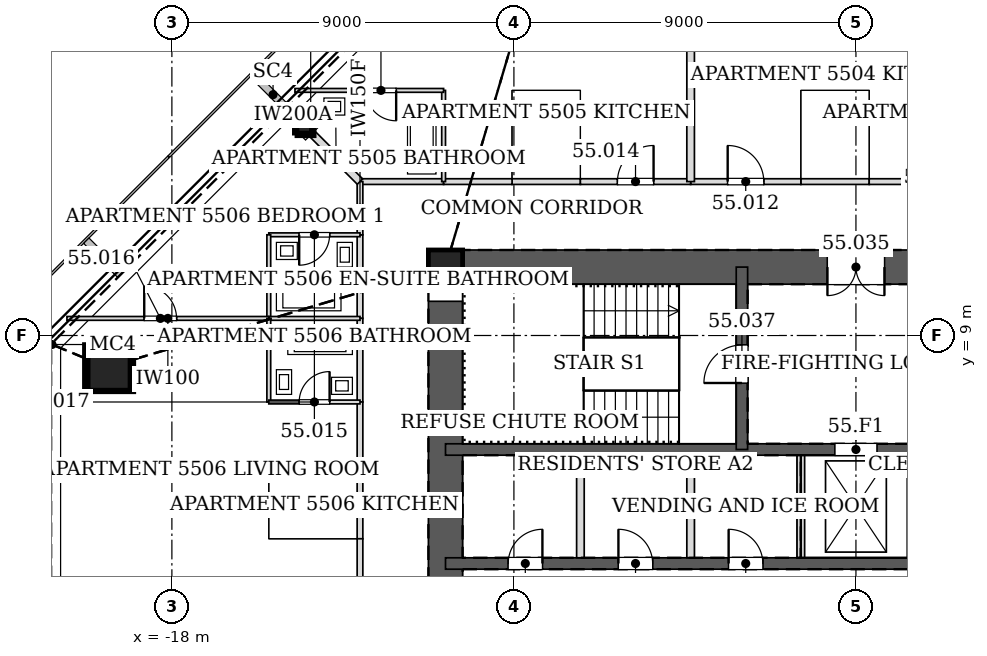
"""IFC4 building model, lengths in metres.
Left out: names, types, materials, properties, quantities, classifications, styles, units other than length and angle.
Written with IfcOpenShell. Run it as: python <this file> out.ifc"""

import sys

from ifc_helpers import new_model, si_unit, direction, frame, frame_2d, origin, origin_2d, place, context, subcontext, project, spatial, rectangle, hollow_rectangle, extrude, element, fill, save


model = new_model("IFC4")
c1 = context("Model", 3, precision=1e-05, world=origin(), true_north=direction((0.0, 1.0)))
c2 = subcontext(c1, "Body", "Model", "MODEL_VIEW")
j1 = project(units=[si_unit("LENGTHUNIT", "METRE"), si_unit("PLANEANGLEUNIT", "RADIAN")], contexts=[c1])
p1 = place(None, origin())
s1 = spatial("IfcSite", under=j1, at=p1, CompositionType="ELEMENT")
p2 = place(p1, origin())
s2 = spatial("IfcBuilding", under=s1, at=p2, CompositionType="ELEMENT")
p3 = place(p2, frame((0.0, 0.0, 234.6)))
s3 = spatial("IfcBuildingStorey", under=s2, at=p3, CompositionType="ELEMENT", Elevation=234.6)
p4 = place(p3, frame((-19.7, 8.16, 0.0), z_axis=(0.02827915051, -0.01169924247, 0.999531598986), x_axis=(0.382282742426, 0.924045401938, 0.0)))
e1 = element("IfcColumn", 1, at=p4, inside=s3, PredefinedType="COLUMN", context=c2, shape_type="SweptSolid", body=[
    extrude(hollow_rectangle(XDim=1.2, YDim=1.2, WallThickness=0.055, at=origin_2d()), origin(), (0.0, 0.0, 1.0), 3.402),
])
p5 = place(p3, frame((-14.551, 14.551, 0.0), z_axis=(0.020026431307, -0.020026431307, 0.999598861593), x_axis=(0.707106781187, 0.707106781187, 0.0)))
e2 = element("IfcColumn", 2, at=p5, inside=s3, PredefinedType="COLUMN", context=c2, shape_type="SweptSolid", body=[
    extrude(hollow_rectangle(XDim=0.45, YDim=0.45, WallThickness=0.02, at=origin_2d()), origin(), (0.0, 0.0, 1.0), 3.401),
])
p6 = place(p3, frame((-10.8, 10.8, 0.0), z_axis=(0.0, 0.0, 1.0), x_axis=(1.0, 0.0, 0.0)))
e3 = element("IfcColumn", 3, at=p6, inside=s3, PredefinedType="COLUMN", context=c2, shape_type="SweptSolid", body=[
    extrude(hollow_rectangle(XDim=0.9, YDim=0.9, WallThickness=0.04, at=origin_2d()), origin(), (0.0, 0.0, 1.0), 3.4),
])
p7 = place(p3, frame((10.8, 10.8, 0.0), z_axis=(0.0, 0.0, 1.0), x_axis=(-1.0, 0.0, 0.0)))
e4 = element("IfcWall", 4, at=p7, inside=s3, PredefinedType="SOLIDWALL", context=c2, shape_type="SweptSolid", body=[
    extrude(rectangle(XDim=21.6, YDim=0.9, at=frame_2d((10.8, 0.0))), origin(), (0.0, 0.0, 1.0), 3.4),
])
p8 = place(p7, frame((10.05, 0.0, 0.0)))
e5 = element("IfcOpeningElement", 5, at=p8, cuts=e4, PredefinedType="OPENING", context=c2, shape_type="SweptSolid", body=[
    extrude(rectangle(XDim=1.5, YDim=2.1, at=frame_2d((0.75, 1.05))), frame((0.0, 0.46, 0.0), z_axis=(0.0, -1.0, 0.0), x_axis=(1.0, 0.0, 0.0)), (0.0, 0.0, 1.0), 0.92),
])
p9 = place(p3, frame((-10.8, 10.8, 0.0), z_axis=(0.0, 0.0, 1.0), x_axis=(0.0, -1.0, 0.0)))
e6 = element("IfcWall", 6, at=p9, inside=s3, PredefinedType="SOLIDWALL", context=c2, shape_type="SweptSolid", body=[
    extrude(rectangle(XDim=21.6, YDim=0.9, at=frame_2d((10.8, 0.0))), origin(), (0.0, 0.0, 1.0), 3.4),
])
p10 = place(p9, frame((8.7, 0.0, 0.0)))
e7 = element("IfcOpeningElement", 7, at=p10, cuts=e6, PredefinedType="OPENING", context=c2, shape_type="SweptSolid", body=[
    extrude(rectangle(XDim=1.2, YDim=2.1, at=frame_2d((0.6, 1.05))), frame((0.0, 0.46, 0.0), z_axis=(0.0, -1.0, 0.0), x_axis=(1.0, 0.0, 0.0)), (0.0, 0.0, 1.0), 0.92),
])
p11 = place(p9, frame((11.7, 0.0, 0.0)))
e8 = element("IfcOpeningElement", 8, at=p11, cuts=e6, PredefinedType="OPENING", context=c2, shape_type="SweptSolid", body=[
    extrude(rectangle(XDim=1.2, YDim=2.1, at=frame_2d((0.6, 1.05))), frame((0.0, 0.46, 0.0), z_axis=(0.0, -1.0, 0.0), x_axis=(1.0, 0.0, 0.0)), (0.0, 0.0, 1.0), 0.92),
])
p12 = place(p3, frame((-10.8, 3.0, 0.0), z_axis=(0.0, 0.0, 1.0), x_axis=(1.0, 0.0, 0.0)))
e9 = element("IfcWall", 9, at=p12, inside=s3, PredefinedType="SOLIDWALL", context=c2, shape_type="SweptSolid", body=[
    extrude(rectangle(XDim=21.6, YDim=0.3, at=frame_2d((10.8, 0.0))), origin(), (0.0, 0.0, 1.0), 3.4),
])
p13 = place(p12, frame((1.65, 0.0, 0.0)))
e10 = element("IfcOpeningElement", 10, at=p13, cuts=e9, PredefinedType="OPENING", context=c2, shape_type="SweptSolid", body=[
    extrude(rectangle(XDim=0.9, YDim=2.1, at=frame_2d((0.45, 1.05))), frame((0.0, 0.16, 0.0), z_axis=(0.0, -1.0, 0.0), x_axis=(1.0, 0.0, 0.0)), (0.0, 0.0, 1.0), 0.32),
])
p14 = place(p12, frame((7.45, 0.0, 0.0)))
e11 = element("IfcOpeningElement", 11, at=p14, cuts=e9, PredefinedType="OPENING", context=c2, shape_type="SweptSolid", body=[
    extrude(rectangle(XDim=0.9, YDim=2.1, at=frame_2d((0.45, 1.05))), frame((0.0, 0.16, 0.0), z_axis=(0.0, -1.0, 0.0), x_axis=(1.0, 0.0, 0.0)), (0.0, 0.0, 1.0), 0.32),
])
p15 = place(p12, frame((13.25, 0.0, 0.0)))
e12 = element("IfcOpeningElement", 12, at=p15, cuts=e9, PredefinedType="OPENING", context=c2, shape_type="SweptSolid", body=[
    extrude(rectangle(XDim=0.9, YDim=2.1, at=frame_2d((0.45, 1.05))), frame((0.0, 0.16, 0.0), z_axis=(0.0, -1.0, 0.0), x_axis=(1.0, 0.0, 0.0)), (0.0, 0.0, 1.0), 0.32),
])
p16 = place(p12, frame((16.15, 0.0, 0.0)))
e13 = element("IfcOpeningElement", 13, at=p16, cuts=e9, PredefinedType="OPENING", context=c2, shape_type="SweptSolid", body=[
    extrude(rectangle(XDim=0.9, YDim=2.1, at=frame_2d((0.45, 1.05))), frame((0.0, 0.16, 0.0), z_axis=(0.0, -1.0, 0.0), x_axis=(1.0, 0.0, 0.0)), (0.0, 0.0, 1.0), 0.32),
])
p17 = place(p12, frame((19.05, 0.0, 0.0)))
e14 = element("IfcOpeningElement", 14, at=p17, cuts=e9, PredefinedType="OPENING", context=c2, shape_type="SweptSolid", body=[
    extrude(rectangle(XDim=0.9, YDim=2.1, at=frame_2d((0.45, 1.05))), frame((0.0, 0.16, 0.0), z_axis=(0.0, -1.0, 0.0), x_axis=(1.0, 0.0, 0.0)), (0.0, 0.0, 1.0), 0.32),
])
p18 = place(p12, frame((4.55, 0.0, 0.0)))
e15 = element("IfcOpeningElement", 15, at=p18, cuts=e9, PredefinedType="OPENING", context=c2, shape_type="SweptSolid", body=[
    extrude(rectangle(XDim=0.9, YDim=2.1, at=frame_2d((0.45, 1.05))), frame((0.0, 0.16, 0.0), z_axis=(0.0, -1.0, 0.0), x_axis=(1.0, 0.0, 0.0)), (0.0, 0.0, 1.0), 0.32),
])
p19 = place(p3, frame((-10.8, 6.0, 0.0), z_axis=(0.0, 0.0, 1.0), x_axis=(1.0, 0.0, 0.0)))
e16 = element("IfcWall", 16, at=p19, inside=s3, PredefinedType="SOLIDWALL", context=c2, shape_type="SweptSolid", body=[
    extrude(rectangle(XDim=21.6, YDim=0.3, at=frame_2d((10.8, 0.0))), origin(), (0.0, 0.0, 1.0), 3.4),
])
p20 = place(p19, frame((10.25, 0.0, 0.0)))
e17 = element("IfcOpeningElement", 17, at=p20, cuts=e16, PredefinedType="OPENING", context=c2, shape_type="SweptSolid", body=[
    extrude(rectangle(XDim=1.1, YDim=2.1, at=frame_2d((0.55, 1.05))), frame((0.0, 0.16, 0.0), z_axis=(0.0, -1.0, 0.0), x_axis=(1.0, 0.0, 0.0)), (0.0, 0.0, 1.0), 0.32),
])
p21 = place(p3, frame((-3.0, 6.0, 0.0), z_axis=(0.0, 0.0, 1.0), x_axis=(0.0, 1.0, 0.0)))
e18 = element("IfcWall", 18, at=p21, inside=s3, PredefinedType="SOLIDWALL", context=c2, shape_type="SweptSolid", body=[
    extrude(rectangle(XDim=4.8, YDim=0.3, at=frame_2d((2.4, 0.0))), origin(), (0.0, 0.0, 1.0), 3.4),
])
p22 = place(p21, frame((1.75, 0.0, 0.0)))
e19 = element("IfcOpeningElement", 19, at=p22, cuts=e18, PredefinedType="OPENING", context=c2, shape_type="SweptSolid", body=[
    extrude(rectangle(XDim=1.0, YDim=2.1, at=frame_2d((0.5, 1.05))), frame((0.0, 0.16, 0.0), z_axis=(0.0, -1.0, 0.0), x_axis=(1.0, 0.0, 0.0)), (0.0, 0.0, 1.0), 0.32),
])
p23 = place(p3, frame((0.351, 13.05, 0.0), z_axis=(0.0, 0.0, 1.0), x_axis=(-1.0, 0.0, 0.0)))
e20 = element("IfcWall", 20, at=p23, inside=s3, PredefinedType="PARTITIONING", context=c2, shape_type="SweptSolid", body=[
    extrude(rectangle(XDim=1.802, YDim=0.15, at=frame_2d((0.901, 0.0))), origin(), (0.0, 0.0, 1.0), 2.331),
])
p24 = place(p3, frame((-1.449, 13.05, 0.0), z_axis=(0.0, 0.0, 1.0), x_axis=(-1.0, 0.0, 0.0)))
e21 = element("IfcWall", 21, at=p24, inside=s3, PredefinedType="PARTITIONING", context=c2, shape_type="SweptSolid", body=[
    extrude(rectangle(XDim=2.902, YDim=0.15, at=frame_2d((1.451, 0.0))), origin(), (0.0, 0.0, 1.0), 2.73),
])
p25 = place(p24, frame((0.976, 0.0, 0.0)))
e22 = element("IfcOpeningElement", 22, at=p25, cuts=e21, PredefinedType="OPENING", context=c2, shape_type="SweptSolid", body=[
    extrude(rectangle(XDim=0.95, YDim=2.1, at=frame_2d((0.475, 1.05))), frame((0.0, 0.085, 0.0), z_axis=(0.0, -1.0, 0.0), x_axis=(1.0, 0.0, 0.0)), (0.0, 0.0, 1.0), 0.17),
])
p26 = place(p3, frame((2.151, 13.05, 0.0), z_axis=(0.0, 0.0, 1.0), x_axis=(-1.0, 0.0, 0.0)))
e23 = element("IfcWall", 23, at=p26, inside=s3, PredefinedType="PARTITIONING", context=c2, shape_type="SweptSolid", body=[
    extrude(rectangle(XDim=1.802, YDim=0.15, at=frame_2d((0.901, 0.0))), origin(), (0.0, 0.0, 1.0), 2.73),
])
p27 = place(p3, frame((-10.849, 13.05, 0.0), z_axis=(0.0, 0.0, 1.0), x_axis=(-1.0, 0.0, 0.0)))
e24 = element("IfcWall", 24, at=p27, inside=s3, PredefinedType="PARTITIONING", context=c2, shape_type="SweptSolid", body=[
    extrude(rectangle(XDim=2.201, YDim=0.15, at=frame_2d((1.101, 0.0))), origin(), (0.0, 0.0, 1.0), 2.583),
])
p28 = place(p3, frame((-7.249, 13.05, 0.0), z_axis=(0.0, 0.0, 1.0), x_axis=(-1.0, 0.0, 0.0)))
e25 = element("IfcWall", 25, at=p28, inside=s3, PredefinedType="PARTITIONING", context=c2, shape_type="SweptSolid", body=[
    extrude(rectangle(XDim=1.802, YDim=0.15, at=frame_2d((0.901, 0.0))), origin(), (0.0, 0.0, 1.0), 2.73),
])
p29 = place(p3, frame((-9.049, 13.05, 0.0), z_axis=(0.0, 0.0, 1.0), x_axis=(-1.0, 0.0, 0.0)))
e26 = element("IfcWall", 26, at=p29, inside=s3, PredefinedType="PARTITIONING", context=c2, shape_type="SweptSolid", body=[
    extrude(rectangle(XDim=1.802, YDim=0.15, at=frame_2d((0.901, 0.0))), origin(), (0.0, 0.0, 1.0), 2.344),
])
p30 = place(p3, frame((-4.349, 13.05, 0.0), z_axis=(0.0, 0.0, 1.0), x_axis=(-1.0, 0.0, 0.0)))
e27 = element("IfcWall", 27, at=p30, inside=s3, PredefinedType="PARTITIONING", context=c2, shape_type="SweptSolid", body=[
    extrude(rectangle(XDim=2.902, YDim=0.15, at=frame_2d((1.451, 0.0))), origin(), (0.0, 0.0, 1.0), 2.73),
])
p31 = place(p30, frame((0.976, 0.0, 0.0)))
e28 = element("IfcOpeningElement", 28, at=p31, cuts=e27, PredefinedType="OPENING", context=c2, shape_type="SweptSolid", body=[
    extrude(rectangle(XDim=0.95, YDim=2.1, at=frame_2d((0.475, 1.05))), frame((0.0, 0.085, 0.0), z_axis=(0.0, -1.0, 0.0), x_axis=(1.0, 0.0, 0.0)), (0.0, 0.0, 1.0), 0.17),
])
p32 = place(p3, frame((-13.05, 11.651, 0.0), z_axis=(0.0, 0.0, 1.0), x_axis=(0.0, -1.0, 0.0)))
e29 = element("IfcWall", 29, at=p32, inside=s3, PredefinedType="PARTITIONING", context=c2, shape_type="SweptSolid", body=[
    extrude(rectangle(XDim=2.202, YDim=0.15, at=frame_2d((1.101, 0.0))), origin(), (0.0, 0.0, 1.0), 2.344),
])
p33 = place(p3, frame((-13.05, 13.05, 0.0), z_axis=(0.0, 0.0, 1.0), x_axis=(0.0, -1.0, 0.0)))
e30 = element("IfcWall", 30, at=p33, inside=s3, PredefinedType="PARTITIONING", context=c2, shape_type="SweptSolid", body=[
    extrude(rectangle(XDim=1.401, YDim=0.15, at=frame_2d((0.701, 0.0))), origin(), (0.0, 0.0, 1.0), 2.583),
])
p34 = place(p3, frame((-13.05, 9.451, 0.0), z_axis=(0.0, 0.0, 1.0), x_axis=(0.0, -1.0, 0.0)))
e31 = element("IfcWall", 31, at=p34, inside=s3, PredefinedType="PARTITIONING", context=c2, shape_type="SweptSolid", body=[
    extrude(rectangle(XDim=2.202, YDim=0.15, at=frame_2d((1.101, 0.0))), origin(), (0.0, 0.0, 1.0), 2.73),
])
p35 = place(p3, frame((-13.05, 5.451, 0.0), z_axis=(0.0, 0.0, 1.0), x_axis=(0.0, -1.0, 0.0)))
e32 = element("IfcWall", 32, at=p35, inside=s3, PredefinedType="PARTITIONING", context=c2, shape_type="SweptSolid", body=[
    extrude(rectangle(XDim=1.802, YDim=0.15, at=frame_2d((0.901, 0.0))), origin(), (0.0, 0.0, 1.0), 2.73),
])
p36 = place(p3, frame((-13.05, 3.651, 0.0), z_axis=(0.0, 0.0, 1.0), x_axis=(0.0, -1.0, 0.0)))
e33 = element("IfcWall", 33, at=p36, inside=s3, PredefinedType="PARTITIONING", context=c2, shape_type="SweptSolid", body=[
    extrude(rectangle(XDim=4.402, YDim=0.15, at=frame_2d((2.201, 0.0))), origin(), (0.0, 0.0, 1.0), 2.331),
])
p37 = place(p36, frame((1.726, 0.0, 0.0)))
e34 = element("IfcOpeningElement", 34, at=p37, cuts=e33, PredefinedType="OPENING", context=c2, shape_type="SweptSolid", body=[
    extrude(rectangle(XDim=0.95, YDim=2.1, at=frame_2d((0.475, 1.05))), frame((0.0, 0.085, 0.0), z_axis=(0.0, -1.0, 0.0), x_axis=(1.0, 0.0, 0.0)), (0.0, 0.0, 1.0), 0.17),
])
p38 = place(p3, frame((-13.05, 7.251, 0.0), z_axis=(0.0, 0.0, 1.0), x_axis=(0.0, -1.0, 0.0)))
e35 = element("IfcWall", 35, at=p38, inside=s3, PredefinedType="PARTITIONING", context=c2, shape_type="SweptSolid", body=[
    extrude(rectangle(XDim=1.802, YDim=0.15, at=frame_2d((0.901, 0.0))), origin(), (0.0, 0.0, 1.0), 2.73),
])
p39 = place(p3, frame((-4.35, 21.36, 0.0), z_axis=(0.0, 0.0, 1.0), x_axis=(0.0, -1.0, 0.0)))
e36 = element("IfcWall", 36, at=p39, inside=s3, PredefinedType="PARTITIONING", context=c2, shape_type="SweptSolid", body=[
    extrude(rectangle(XDim=8.31, YDim=0.2, at=frame_2d((4.155, 0.0))), origin(), (0.0, 0.0, 1.0), 2.662),
])
p40 = place(p3, frame((-10.85, 13.05, 0.0), z_axis=(0.0, 0.0, 1.0), x_axis=(0.0, 1.0, 0.0)))
e37 = element("IfcWall", 37, at=p40, inside=s3, PredefinedType="PARTITIONING", context=c2, shape_type="SweptSolid", body=[
    extrude(rectangle(XDim=2.4, YDim=0.1, at=frame_2d((1.2, 0.0))), origin(), (0.0, 0.0, 1.0), 2.786),
])
p41 = place(p3, frame((-10.85, 15.45, 0.0), z_axis=(0.0, 0.0, 1.0), x_axis=(-1.0, 0.0, 0.0)))
e38 = element("IfcWall", 38, at=p41, inside=s3, PredefinedType="PARTITIONING", context=c2, shape_type="SweptSolid", body=[
    extrude(rectangle(XDim=3.912, YDim=0.1, at=frame_2d((1.956, 0.0))), origin(), (0.0, 0.0, 1.0), 2.783),
])
p42 = place(p41, frame((1.249, 0.0, 0.0)))
e39 = element("IfcOpeningElement", 39, at=p42, cuts=e38, PredefinedType="OPENING", context=c2, shape_type="SweptSolid", body=[
    extrude(rectangle(XDim=0.8, YDim=2.1, at=frame_2d((0.4, 1.05))), frame((0.0, 0.06, 0.0), z_axis=(0.0, -1.0, 0.0), x_axis=(1.0, 0.0, 0.0)), (0.0, 0.0, 1.0), 0.12),
])
p43 = place(p3, frame((-14.31, 14.31, 0.0), z_axis=(0.0, 0.0, 1.0), x_axis=(0.707106781187, -0.707106781187, 0.0)))
e40 = element("IfcWall", 40, at=p43, inside=s3, PredefinedType="PARTITIONING", context=c2, shape_type="SweptSolid", body=[
    extrude(rectangle(XDim=1.782, YDim=0.2, at=frame_2d((0.891, 0.0))), origin(), (0.0, 0.0, 1.0), 2.583),
])
p44 = place(p3, frame((-13.05, 11.65, 0.0), z_axis=(0.0, 0.0, 1.0), x_axis=(-1.0, 0.0, 0.0)))
e41 = element("IfcWall", 41, at=p44, inside=s3, PredefinedType="PARTITIONING", context=c2, shape_type="SweptSolid", body=[
    extrude(rectangle(XDim=2.4, YDim=0.1, at=frame_2d((1.2, 0.0))), origin(), (0.0, 0.0, 1.0), 2.786),
])
p45 = place(p44, frame((0.8, 0.0, 0.0)))
e42 = element("IfcOpeningElement", 42, at=p45, cuts=e41, PredefinedType="OPENING", context=c2, shape_type="SweptSolid", body=[
    extrude(rectangle(XDim=0.8, YDim=2.1, at=frame_2d((0.4, 1.05))), frame((0.0, 0.06, 0.0), z_axis=(0.0, -1.0, 0.0), x_axis=(1.0, 0.0, 0.0)), (0.0, 0.0, 1.0), 0.12),
])
p46 = place(p3, frame((-15.45, 11.65, 0.0), z_axis=(0.0, 0.0, 1.0), x_axis=(0.0, -1.0, 0.0)))
e43 = element("IfcWall", 43, at=p46, inside=s3, PredefinedType="PARTITIONING", context=c2, shape_type="SweptSolid", body=[
    extrude(rectangle(XDim=2.2, YDim=0.1, at=frame_2d((1.1, 0.0))), origin(), (0.0, 0.0, 1.0), 2.344),
])
p47 = place(p3, frame((-15.45, 9.45, 0.0), z_axis=(0.0, 0.0, 1.0), x_axis=(1.0, 0.0, 0.0)))
e44 = element("IfcWall", 44, at=p47, inside=s3, PredefinedType="PARTITIONING", context=c2, shape_type="SweptSolid", body=[
    extrude(rectangle(XDim=2.4, YDim=0.1, at=frame_2d((1.2, 0.0))), origin(), (0.0, 0.0, 1.0), 2.344),
])
p48 = place(p3, frame((-20.762, 9.45, 0.0), z_axis=(0.0, 0.0, 1.0), x_axis=(1.0, 0.0, 0.0)))
e45 = element("IfcWall", 45, at=p48, inside=s3, PredefinedType="PARTITIONING", context=c2, shape_type="SweptSolid", body=[
    extrude(rectangle(XDim=5.312, YDim=0.1, at=frame_2d((2.656, 0.0))), origin(), (0.0, 0.0, 1.0), 2.344),
])
p49 = place(p48, frame((2.034, 0.0, 0.0)))
e46 = element("IfcOpeningElement", 46, at=p49, cuts=e45, PredefinedType="OPENING", context=c2, shape_type="SweptSolid", body=[
    extrude(rectangle(XDim=0.85, YDim=2.1, at=frame_2d((0.425, 1.05))), frame((0.0, 0.06, 0.0), z_axis=(0.0, -1.0, 0.0), x_axis=(1.0, 0.0, 0.0)), (0.0, 0.0, 1.0), 0.12),
])
p50 = place(p3, frame((-15.45, 9.45, 0.0), z_axis=(0.0, 0.0, 1.0), x_axis=(0.0, -1.0, 0.0)))
e47 = element("IfcWall", 47, at=p50, inside=s3, PredefinedType="PARTITIONING", context=c2, shape_type="SweptSolid", body=[
    extrude(rectangle(XDim=2.2, YDim=0.1, at=frame_2d((1.1, 0.0))), origin(), (0.0, 0.0, 1.0), 2.344),
])
p51 = place(p3, frame((-15.45, 7.25, 0.0), z_axis=(0.0, 0.0, 1.0), x_axis=(1.0, 0.0, 0.0)))
e48 = element("IfcWall", 48, at=p51, inside=s3, PredefinedType="PARTITIONING", context=c2, shape_type="SweptSolid", body=[
    extrude(rectangle(XDim=2.4, YDim=0.1, at=frame_2d((1.2, 0.0))), origin(), (0.0, 0.0, 1.0), 2.73),
])
p52 = place(p51, frame((0.8, 0.0, 0.0)))
e49 = element("IfcOpeningElement", 49, at=p52, cuts=e48, PredefinedType="OPENING", context=c2, shape_type="SweptSolid", body=[
    extrude(rectangle(XDim=0.8, YDim=2.1, at=frame_2d((0.4, 1.05))), frame((0.0, 0.06, 0.0), z_axis=(0.0, -1.0, 0.0), x_axis=(1.0, 0.0, 0.0)), (0.0, 0.0, 1.0), 0.12),
])
for number, where, z_axis, x_axis in (
    (50, (-7.25, 3.15, 0.0), (0.0, 0.0, 1.0), (0.0, 1.0, 0.0)),
    (51, (-4.35, 3.15, 0.0), (0.0, 0.0, 1.0), (0.0, 1.0, 0.0)),
    (52, (-1.45, 3.15, 0.0), (0.0, 0.0, 1.0), (0.0, 1.0, 0.0)),
    (53, (1.45, 3.15, 0.0), (0.0, 0.0, 1.0), (0.0, 1.0, 0.0)),
):
    element("IfcWall", number, at=place(p3, frame(where, z_axis=z_axis, x_axis=x_axis)), inside=s3, PredefinedType="PARTITIONING", context=c2, shape_type="SweptSolid", body=[
        extrude(rectangle(XDim=2.7, YDim=0.2, at=frame_2d((1.35, 0.0))), origin(), (0.0, 0.0, 1.0), 3.2),
    ])
p53 = place(p25, frame((0.95, 0.0, 0.0), z_axis=(0.0, 0.0, 1.0), x_axis=(-1.0, 0.0, 0.0)))
e54 = element("IfcDoor", 54, at=p53, inside=s3, OperationType="SINGLE_SWING_LEFT", PredefinedType="DOOR", context=c2, shape_type="SweptSolid", body=[
    extrude(rectangle(XDim=0.95, YDim=2.1, at=frame_2d((0.475, 1.05))), frame((0.0, 0.025, 0.0), z_axis=(0.0, -1.0, 0.0), x_axis=(1.0, 0.0, 0.0)), (0.0, 0.0, 1.0), 0.05),
])
fill(e22, e54)
p54 = place(p42, origin())
e55 = element("IfcDoor", 55, at=p54, inside=s3, OperationType="SINGLE_SWING_LEFT", PredefinedType="DOOR", context=c2, shape_type="SweptSolid", body=[
    extrude(rectangle(XDim=0.8, YDim=2.1, at=frame_2d((0.4, 1.05))), frame((0.0, 0.025, 0.0), z_axis=(0.0, -1.0, 0.0), x_axis=(1.0, 0.0, 0.0)), (0.0, 0.0, 1.0), 0.05),
])
fill(e39, e55)
p55 = place(p31, frame((0.95, 0.0, 0.0), z_axis=(0.0, 0.0, 1.0), x_axis=(-1.0, 0.0, 0.0)))
e56 = element("IfcDoor", 56, at=p55, inside=s3, OperationType="SINGLE_SWING_RIGHT", PredefinedType="DOOR", context=c2, shape_type="SweptSolid", body=[
    extrude(rectangle(XDim=0.95, YDim=2.1, at=frame_2d((0.475, 1.05))), frame((0.0, 0.025, 0.0), z_axis=(0.0, -1.0, 0.0), x_axis=(1.0, 0.0, 0.0)), (0.0, 0.0, 1.0), 0.05),
])
fill(e28, e56)
p56 = place(p45, origin())
e57 = element("IfcDoor", 57, at=p56, inside=s3, OperationType="SINGLE_SWING_RIGHT", PredefinedType="DOOR", context=c2, shape_type="SweptSolid", body=[
    extrude(rectangle(XDim=0.8, YDim=2.1, at=frame_2d((0.4, 1.05))), frame((0.0, 0.025, 0.0), z_axis=(0.0, -1.0, 0.0), x_axis=(1.0, 0.0, 0.0)), (0.0, 0.0, 1.0), 0.05),
])
fill(e42, e57)
p57 = place(p49, origin())
e58 = element("IfcDoor", 58, at=p57, inside=s3, OperationType="SINGLE_SWING_LEFT", PredefinedType="DOOR", context=c2, shape_type="SweptSolid", body=[
    extrude(rectangle(XDim=0.85, YDim=2.1, at=frame_2d((0.425, 1.05))), frame((0.0, 0.025, 0.0), z_axis=(0.0, -1.0, 0.0), x_axis=(1.0, 0.0, 0.0)), (0.0, 0.0, 1.0), 0.05),
])
fill(e46, e58)
p58 = place(p52, origin())
e59 = element("IfcDoor", 59, at=p58, inside=s3, OperationType="SINGLE_SWING_RIGHT", PredefinedType="DOOR", context=c2, shape_type="SweptSolid", body=[
    extrude(rectangle(XDim=0.8, YDim=2.1, at=frame_2d((0.4, 1.05))), frame((0.0, 0.025, 0.0), z_axis=(0.0, -1.0, 0.0), x_axis=(1.0, 0.0, 0.0)), (0.0, 0.0, 1.0), 0.05),
])
fill(e49, e59)
p59 = place(p8, origin())
e60 = element("IfcDoor", 60, at=p59, inside=s3, OperationType="DOUBLE_DOOR_SINGLE_SWING", PredefinedType="DOOR", context=c2, shape_type="SweptSolid", body=[
    extrude(rectangle(XDim=1.5, YDim=2.1, at=frame_2d((0.75, 1.05))), frame((0.0, 0.025, 0.0), z_axis=(0.0, -1.0, 0.0), x_axis=(1.0, 0.0, 0.0)), (0.0, 0.0, 1.0), 0.05),
])
fill(e5, e60)
p60 = place(p22, origin())
e61 = element("IfcDoor", 61, at=p60, inside=s3, OperationType="SINGLE_SWING_LEFT", PredefinedType="DOOR", context=c2, shape_type="SweptSolid", body=[
    extrude(rectangle(XDim=1.0, YDim=2.1, at=frame_2d((0.5, 1.05))), frame((0.0, 0.025, 0.0), z_axis=(0.0, -1.0, 0.0), x_axis=(1.0, 0.0, 0.0)), (0.0, 0.0, 1.0), 0.05),
])
fill(e19, e61)
p61 = place(p13, origin())
e62 = element("IfcDoor", 62, at=p61, inside=s3, OperationType="SINGLE_SWING_RIGHT", PredefinedType="DOOR", context=c2, shape_type="SweptSolid", body=[
    extrude(rectangle(XDim=0.9, YDim=2.1, at=frame_2d((0.45, 1.05))), frame((0.0, 0.025, 0.0), z_axis=(0.0, -1.0, 0.0), x_axis=(1.0, 0.0, 0.0)), (0.0, 0.0, 1.0), 0.05),
])
fill(e10, e62)
p62 = place(p14, origin())
e63 = element("IfcDoor", 63, at=p62, inside=s3, OperationType="SINGLE_SWING_LEFT", PredefinedType="DOOR", context=c2, shape_type="SweptSolid", body=[
    extrude(rectangle(XDim=0.9, YDim=2.1, at=frame_2d((0.45, 1.05))), frame((0.0, 0.025, 0.0), z_axis=(0.0, -1.0, 0.0), x_axis=(1.0, 0.0, 0.0)), (0.0, 0.0, 1.0), 0.05),
])
fill(e11, e63)
p63 = place(p18, origin())
e64 = element("IfcDoor", 64, at=p63, inside=s3, OperationType="SINGLE_SWING_LEFT", PredefinedType="DOOR", context=c2, shape_type="SweptSolid", body=[
    extrude(rectangle(XDim=0.9, YDim=2.1, at=frame_2d((0.45, 1.05))), frame((0.0, 0.025, 0.0), z_axis=(0.0, -1.0, 0.0), x_axis=(1.0, 0.0, 0.0)), (0.0, 0.0, 1.0), 0.05),
])
fill(e15, e64)
p64 = place(p20, origin())
e65 = element("IfcDoor", 65, at=p64, inside=s3, OperationType="DOUBLE_DOOR_SLIDING", PredefinedType="DOOR", context=c2, shape_type="SweptSolid", body=[
    extrude(rectangle(XDim=1.1, YDim=2.1, at=frame_2d((0.55, 1.05))), frame((0.0, 0.025, 0.0), z_axis=(0.0, -1.0, 0.0), x_axis=(1.0, 0.0, 0.0)), (0.0, 0.0, 1.0), 0.05),
])
fill(e17, e65)
save(model, sys.argv[1])
